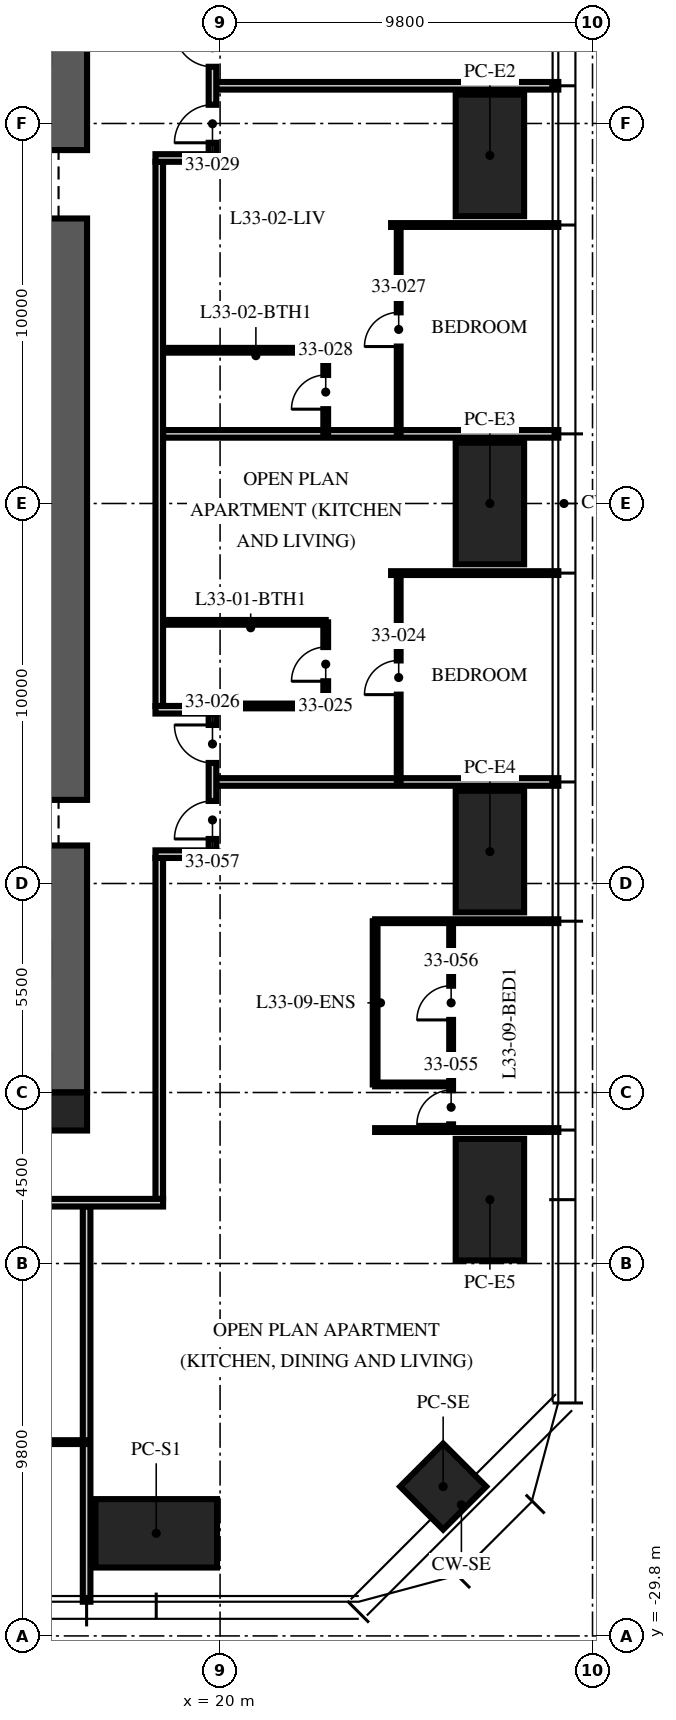
"""IFC4 building model, lengths in metres.
Left out: names, types, materials, properties, quantities, classifications, styles, units other than length and angle.
Written with IfcOpenShell. Run it as: python <this file> out.ifc"""

import sys

from ifc_helpers import new_model, si_unit, direction, frame, frame_2d, origin, origin_2d, place, context, subcontext, project, spatial, rectangle, extrude, element, fill, save


model = new_model("IFC4")
c1 = context("Model", 3, precision=1e-05, world=origin(), true_north=direction((0.0, 1.0)))
c2 = subcontext(c1, "Body", "Model", "MODEL_VIEW")
j1 = project(units=[si_unit("LENGTHUNIT", "METRE"), si_unit("PLANEANGLEUNIT", "RADIAN")], contexts=[c1])
p1 = place(None, origin())
s1 = spatial("IfcSite", under=j1, at=p1, CompositionType="ELEMENT")
p2 = place(p1, origin())
s2 = spatial("IfcBuilding", under=s1, at=p2, CompositionType="ELEMENT")
p3 = place(p2, frame((0.0, 0.0, 133.5)))
s3 = spatial("IfcBuildingStorey", under=s2, at=p3, CompositionType="ELEMENT", Elevation=133.5)
p4 = place(p3, frame((15.5, -15.5, -0.25), z_axis=(0.0, 0.0, 1.0), x_axis=(0.0, 1.0, 0.0)))
e1 = element("IfcWall", 1, at=p4, inside=s3, PredefinedType="SHEAR", context=c2, shape_type="SweptSolid", body=[
    extrude(rectangle(XDim=31.0, YDim=2.0, at=frame_2d((15.5, 0.0))), origin(), (0.0, 0.0, 1.0), 3.75),
])
p5 = place(p4, frame((6.5, 0.0, 0.25)))
e2 = element("IfcOpeningElement", 2, at=p5, cuts=e1, PredefinedType="OPENING", context=c2, shape_type="SweptSolid", body=[
    extrude(rectangle(XDim=1.2, YDim=2.1, at=frame_2d((0.6, 1.05))), frame((0.0, 1.01, 0.0), z_axis=(0.0, -1.0, 0.0), x_axis=(1.0, 0.0, 0.0)), (0.0, 0.0, 1.0), 2.02),
])
p6 = place(p4, frame((23.0, 0.0, 0.25)))
e3 = element("IfcOpeningElement", 3, at=p6, cuts=e1, PredefinedType="OPENING", context=c2, shape_type="SweptSolid", body=[
    extrude(rectangle(XDim=1.8, YDim=2.1, at=frame_2d((0.9, 1.05))), frame((0.0, 1.01, 0.0), z_axis=(0.0, -1.0, 0.0), x_axis=(1.0, 0.0, 0.0)), (0.0, 0.0, 1.0), 2.02),
])
p7 = place(p3, frame((16.0, -16.0, -0.25), z_axis=(0.0, 0.0, 1.0), x_axis=(1.0, 0.0, 0.0)))
e4 = element("IfcColumn", 4, at=p7, inside=s3, PredefinedType="COLUMN", context=c2, shape_type="SweptSolid", body=[
    extrude(rectangle(XDim=1.0, YDim=1.0, at=origin_2d()), origin(), (0.0, 0.0, 1.0), 3.75),
])
for number, where, z_axis, x_axis in (
    (5, (27.1, 9.16, 0.0), (0.0, 0.0, 1.0), (0.0, 1.0, 0.0)),
    (6, (27.1, 0.0, 0.0), (0.0, 0.0, 1.0), (0.0, 1.0, 0.0)),
    (7, (27.1, -9.16, 0.0), (0.0, 0.0, 1.0), (0.0, 1.0, 0.0)),
    (8, (27.1, -18.32, 0.0), (0.0, 0.0, 1.0), (0.0, 1.0, 0.0)),
    (9, (18.32, -27.1, 0.0), (0.0, 0.0, 1.0), (1.0, 0.0, 0.0)),
):
    element("IfcColumn", number, at=place(p3, frame(where, z_axis=z_axis, x_axis=x_axis)), inside=s3, PredefinedType="COLUMN", context=c2, shape_type="SweptSolid", body=[
        extrude(rectangle(XDim=3.2, YDim=1.8, at=origin_2d()), origin(), (0.0, 0.0, 1.0), 3.75),
    ])
p8 = place(p3, frame((25.87, -25.87, 0.0), z_axis=(0.0, 0.0, 1.0), x_axis=(0.707106781187, 0.707106781187, 0.0)))
e10 = element("IfcColumn", 10, at=p8, inside=s3, PredefinedType="COLUMN", context=c2, shape_type="SweptSolid", body=[
    extrude(rectangle(XDim=1.6, YDim=1.6, at=origin_2d()), origin(), (0.0, 0.0, 1.0), 3.75),
])
p9 = place(p3, frame((19.9, -7.328, 0.0), z_axis=(0.0, 0.0, 1.0), x_axis=(1.0, 0.0, 0.0)))
e11 = element("IfcWall", 11, at=p9, inside=s3, PredefinedType="PARTITIONING", context=c2, shape_type="SweptSolid", body=[
    extrude(rectangle(XDim=9.0, YDim=0.2, at=frame_2d((4.5, 0.0))), origin(), (0.0, 0.0, 1.0), 2.81),
])
p10 = place(p3, frame((24.5, -1.832, 0.0), z_axis=(0.0, 0.0, 1.0), x_axis=(1.0, 0.0, 0.0)))
e12 = element("IfcWall", 12, at=p10, inside=s3, PredefinedType="PARTITIONING", context=c2, shape_type="SweptSolid", body=[
    extrude(rectangle(XDim=4.4, YDim=0.1, at=frame_2d((2.2, 0.0))), origin(), (0.0, 0.0, 1.0), 2.81),
])
p11 = place(p3, frame((18.5, 1.832, 0.0), z_axis=(0.0, 0.0, 1.0), x_axis=(1.0, 0.0, 0.0)))
e13 = element("IfcWall", 13, at=p11, inside=s3, PredefinedType="PARTITIONING", context=c2, shape_type="SweptSolid", body=[
    extrude(rectangle(XDim=10.4, YDim=0.2, at=frame_2d((5.2, 0.0))), origin(), (0.0, 0.0, 1.0), 2.81),
])
p12 = place(p3, frame((24.5, 7.328, 0.0), z_axis=(0.0, 0.0, 1.0), x_axis=(1.0, 0.0, 0.0)))
e14 = element("IfcWall", 14, at=p12, inside=s3, PredefinedType="PARTITIONING", context=c2, shape_type="SweptSolid", body=[
    extrude(rectangle(XDim=4.4, YDim=0.1, at=frame_2d((2.2, 0.0))), origin(), (0.0, 0.0, 1.0), 2.81),
])
p13 = place(p3, frame((19.9, 10.992, 0.0), z_axis=(0.0, 0.0, 1.0), x_axis=(1.0, 0.0, 0.0)))
e15 = element("IfcWall", 15, at=p13, inside=s3, PredefinedType="PARTITIONING", context=c2, shape_type="SweptSolid", body=[
    extrude(rectangle(XDim=9.0, YDim=0.2, at=frame_2d((4.5, 0.0))), origin(), (0.0, 0.0, 1.0), 2.81),
])
p14 = place(p3, frame((16.488, -18.5, 0.0), z_axis=(0.0, 0.0, 1.0), x_axis=(0.0, -1.0, 0.0)))
e16 = element("IfcWall", 16, at=p14, inside=s3, PredefinedType="PARTITIONING", context=c2, shape_type="SweptSolid", body=[
    extrude(rectangle(XDim=10.4, YDim=0.2, at=frame_2d((5.2, 0.0))), origin(), (0.0, 0.0, 1.0), 2.81),
])
for number, where, z_axis, x_axis in (
    (17, (24.08, -16.488, 0.0), (0.0, 0.0, 1.0), (1.0, 0.0, 0.0)),
    (18, (24.08, -10.992, 0.0), (0.0, 0.0, 1.0), (1.0, 0.0, 0.0)),
):
    element("IfcWall", number, at=place(p3, frame(where, z_axis=z_axis, x_axis=x_axis)), inside=s3, PredefinedType="PARTITIONING", context=c2, shape_type="SweptSolid", body=[
        extrude(rectangle(XDim=4.82, YDim=0.1, at=frame_2d((2.41, 0.0))), origin(), (0.0, 0.0, 1.0), 2.81),
    ])
p15 = place(p3, frame((24.7, -7.328, 0.0), z_axis=(0.0, 0.0, 1.0), x_axis=(0.0, 1.0, 0.0)))
e19 = element("IfcWall", 19, at=p15, inside=s3, PredefinedType="PARTITIONING", context=c2, shape_type="SweptSolid", body=[
    extrude(rectangle(XDim=5.496, YDim=0.1, at=frame_2d((2.748, 0.0))), origin(), (0.0, 0.0, 1.0), 2.81),
])
p16 = place(p15, frame((2.298, 0.0, 0.0)))
e20 = element("IfcOpeningElement", 20, at=p16, cuts=e19, PredefinedType="OPENING", context=c2, shape_type="SweptSolid", body=[
    extrude(rectangle(XDim=0.9, YDim=2.1, at=frame_2d((0.45, 1.05))), frame((0.0, 0.06, 0.0), z_axis=(0.0, -1.0, 0.0), x_axis=(1.0, 0.0, 0.0)), (0.0, 0.0, 1.0), 0.12),
])
p17 = place(p3, frame((22.78, -5.328, 0.0), z_axis=(0.0, 0.0, 1.0), x_axis=(0.0, 1.0, 0.0)))
e21 = element("IfcWall", 21, at=p17, inside=s3, PredefinedType="PARTITIONING", context=c2, shape_type="SweptSolid", body=[
    extrude(rectangle(XDim=2.2, YDim=0.125, at=frame_2d((1.1, 0.0))), origin(), (0.0, 0.0, 1.0), 2.81),
])
p18 = place(p17, frame((0.65, 0.0, 0.0)))
e22 = element("IfcOpeningElement", 22, at=p18, cuts=e21, PredefinedType="OPENING", context=c2, shape_type="SweptSolid", body=[
    extrude(rectangle(XDim=0.9, YDim=2.1, at=frame_2d((0.45, 1.05))), frame((0.0, 0.073, 0.0), z_axis=(0.0, -1.0, 0.0), x_axis=(1.0, 0.0, 0.0)), (0.0, 0.0, 1.0), 0.145),
])
p19 = place(p3, frame((19.97, -5.328, 0.0), z_axis=(0.0, 0.0, 1.0), x_axis=(1.0, 0.0, 0.0)))
e23 = element("IfcWall", 23, at=p19, inside=s3, PredefinedType="PARTITIONING", context=c2, shape_type="SweptSolid", body=[
    extrude(rectangle(XDim=2.81, YDim=0.125, at=frame_2d((1.405, 0.0))), origin(), (0.0, 0.0, 1.0), 3.5),
])
p20 = place(p3, frame((18.5, -3.128, 0.0), z_axis=(0.0, 0.0, 1.0), x_axis=(1.0, 0.0, 0.0)))
e24 = element("IfcWall", 24, at=p20, inside=s3, PredefinedType="PARTITIONING", context=c2, shape_type="SweptSolid", body=[
    extrude(rectangle(XDim=4.28, YDim=0.125, at=frame_2d((2.14, 0.0))), origin(), (0.0, 0.0, 1.0), 3.5),
])
p21 = place(p3, frame((24.7, 1.832, 0.0), z_axis=(0.0, 0.0, 1.0), x_axis=(0.0, 1.0, 0.0)))
e25 = element("IfcWall", 25, at=p21, inside=s3, PredefinedType="PARTITIONING", context=c2, shape_type="SweptSolid", body=[
    extrude(rectangle(XDim=5.496, YDim=0.1, at=frame_2d((2.748, 0.0))), origin(), (0.0, 0.0, 1.0), 2.81),
])
p22 = place(p21, frame((2.298, 0.0, 0.0)))
e26 = element("IfcOpeningElement", 26, at=p22, cuts=e25, PredefinedType="OPENING", context=c2, shape_type="SweptSolid", body=[
    extrude(rectangle(XDim=0.9, YDim=2.1, at=frame_2d((0.45, 1.05))), frame((0.0, 0.06, 0.0), z_axis=(0.0, -1.0, 0.0), x_axis=(1.0, 0.0, 0.0)), (0.0, 0.0, 1.0), 0.12),
])
p23 = place(p3, frame((22.78, 1.832, 0.0), z_axis=(0.0, 0.0, 1.0), x_axis=(0.0, 1.0, 0.0)))
e27 = element("IfcWall", 27, at=p23, inside=s3, PredefinedType="PARTITIONING", context=c2, shape_type="SweptSolid", body=[
    extrude(rectangle(XDim=2.2, YDim=0.125, at=frame_2d((1.1, 0.0))), origin(), (0.0, 0.0, 1.0), 3.5),
])
p24 = place(p23, frame((0.65, 0.0, 0.0)))
e28 = element("IfcOpeningElement", 28, at=p24, cuts=e27, PredefinedType="OPENING", context=c2, shape_type="SweptSolid", body=[
    extrude(rectangle(XDim=0.9, YDim=2.1, at=frame_2d((0.45, 1.05))), frame((0.0, 0.073, 0.0), z_axis=(0.0, -1.0, 0.0), x_axis=(1.0, 0.0, 0.0)), (0.0, 0.0, 1.0), 0.145),
])
p25 = place(p3, frame((18.5, 4.032, 0.0), z_axis=(0.0, 0.0, 1.0), x_axis=(1.0, 0.0, 0.0)))
e29 = element("IfcWall", 29, at=p25, inside=s3, PredefinedType="PARTITIONING", context=c2, shape_type="SweptSolid", body=[
    extrude(rectangle(XDim=4.28, YDim=0.125, at=frame_2d((2.14, 0.0))), origin(), (0.0, 0.0, 1.0), 3.5),
])
p26 = place(p3, frame((10.992, -24.7, 0.0), z_axis=(0.0, 0.0, 1.0), x_axis=(1.0, 0.0, 0.0)))
e30 = element("IfcWall", 30, at=p26, inside=s3, PredefinedType="PARTITIONING", context=c2, shape_type="SweptSolid", body=[
    extrude(rectangle(XDim=5.496, YDim=0.1, at=frame_2d((2.748, 0.0))), origin(), (0.0, 0.0, 1.0), 2.81),
])
p27 = place(p26, frame((2.298, 0.0, 0.0)))
e31 = element("IfcOpeningElement", 31, at=p27, cuts=e30, PredefinedType="OPENING", context=c2, shape_type="SweptSolid", body=[
    extrude(rectangle(XDim=0.9, YDim=2.1, at=frame_2d((0.45, 1.05))), frame((0.0, 0.06, 0.0), z_axis=(0.0, -1.0, 0.0), x_axis=(1.0, 0.0, 0.0)), (0.0, 0.0, 1.0), 0.12),
])
p28 = place(p3, frame((26.08, -16.488, 0.0), z_axis=(0.0, 0.0, 1.0), x_axis=(0.0, 1.0, 0.0)))
e32 = element("IfcWall", 32, at=p28, inside=s3, PredefinedType="PARTITIONING", context=c2, shape_type="SweptSolid", body=[
    extrude(rectangle(XDim=5.496, YDim=0.1, at=frame_2d((2.748, 0.0))), origin(), (0.0, 0.0, 1.0), 2.81),
])
p29 = place(p28, frame((0.15, 0.0, 0.0)))
e33 = element("IfcOpeningElement", 33, at=p29, cuts=e32, PredefinedType="OPENING", context=c2, shape_type="SweptSolid", body=[
    extrude(rectangle(XDim=0.9, YDim=2.1, at=frame_2d((0.45, 1.05))), frame((0.0, 0.06, 0.0), z_axis=(0.0, -1.0, 0.0), x_axis=(1.0, 0.0, 0.0)), (0.0, 0.0, 1.0), 0.12),
])
p30 = place(p28, frame((2.898, 0.0, 0.0)))
e34 = element("IfcOpeningElement", 34, at=p30, cuts=e32, PredefinedType="OPENING", context=c2, shape_type="SweptSolid", body=[
    extrude(rectangle(XDim=0.9, YDim=2.1, at=frame_2d((0.45, 1.05))), frame((0.0, 0.06, 0.0), z_axis=(0.0, -1.0, 0.0), x_axis=(1.0, 0.0, 0.0)), (0.0, 0.0, 1.0), 0.12),
])
p31 = place(p3, frame((24.08, -15.288, 0.0), z_axis=(0.0, 0.0, 1.0), x_axis=(1.0, 0.0, 0.0)))
e35 = element("IfcWall", 35, at=p31, inside=s3, PredefinedType="PARTITIONING", context=c2, shape_type="SweptSolid", body=[
    extrude(rectangle(XDim=2.0, YDim=0.1, at=frame_2d((1.0, 0.0))), origin(), (0.0, 0.0, 1.0), 3.5),
])
p32 = place(p3, frame((24.08, -15.288, 0.0), z_axis=(0.0, 0.0, 1.0), x_axis=(0.0, 1.0, 0.0)))
e36 = element("IfcWall", 36, at=p32, inside=s3, PredefinedType="PARTITIONING", context=c2, shape_type="SweptSolid", body=[
    extrude(rectangle(XDim=4.296, YDim=0.125, at=frame_2d((2.148, 0.0))), origin(), (0.0, 0.0, 1.0), 2.81),
])
p33 = place(p3, frame((18.4, -18.3, 0.0), z_axis=(0.0, 0.0, 1.0), x_axis=(0.0, 1.0, 0.0)))
e37 = element("IfcWall", 37, at=p33, inside=s3, PredefinedType="PARTITIONING", context=c2, shape_type="SweptSolid", body=[
    extrude(rectangle(XDim=8.972, YDim=0.2, at=frame_2d((4.486, 0.0))), origin(), (0.0, 0.0, 1.0), 2.3),
])
p34 = place(p3, frame((18.3, -9.228, 0.0), z_axis=(0.0, 0.0, 1.0), x_axis=(1.0, 0.0, 0.0)))
e38 = element("IfcWall", 38, at=p34, inside=s3, PredefinedType="PARTITIONING", context=c2, shape_type="SweptSolid", body=[
    extrude(rectangle(XDim=1.6, YDim=0.2, at=frame_2d((0.8, 0.0))), origin(), (0.0, 0.0, 1.0), 2.7),
])
p35 = place(p3, frame((18.3, -5.428, 0.0), z_axis=(0.0, 0.0, 1.0), x_axis=(1.0, 0.0, 0.0)))
e39 = element("IfcWall", 39, at=p35, inside=s3, PredefinedType="PARTITIONING", context=c2, shape_type="SweptSolid", body=[
    extrude(rectangle(XDim=1.6, YDim=0.2, at=frame_2d((0.8, 0.0))), origin(), (0.0, 0.0, 1.0), 3.5),
])
p36 = place(p3, frame((19.8, -9.128, 0.0), z_axis=(0.0, 0.0, 1.0), x_axis=(0.0, 1.0, 0.0)))
e40 = element("IfcWall", 40, at=p36, inside=s3, PredefinedType="PARTITIONING", context=c2, shape_type="SweptSolid", body=[
    extrude(rectangle(XDim=3.6, YDim=0.2, at=frame_2d((1.8, 0.0))), origin(), (0.0, 0.0, 1.0), 2.7),
])
p37 = place(p36, frame((2.3, 0.0, 0.0)))
e41 = element("IfcOpeningElement", 41, at=p37, cuts=e40, PredefinedType="OPENING", context=c2, shape_type="SweptSolid", body=[
    extrude(rectangle(XDim=1.0, YDim=2.2, at=frame_2d((0.5, 1.1))), frame((0.0, 0.11, 0.0), z_axis=(0.0, -1.0, 0.0), x_axis=(1.0, 0.0, 0.0)), (0.0, 0.0, 1.0), 0.22),
])
p38 = place(p36, frame((0.3, 0.0, 0.0)))
e42 = element("IfcOpeningElement", 42, at=p38, cuts=e40, PredefinedType="OPENING", context=c2, shape_type="SweptSolid", body=[
    extrude(rectangle(XDim=1.0, YDim=2.2, at=frame_2d((0.5, 1.1))), frame((0.0, 0.11, 0.0), z_axis=(0.0, -1.0, 0.0), x_axis=(1.0, 0.0, 0.0)), (0.0, 0.0, 1.0), 0.22),
])
p39 = place(p3, frame((18.4, -5.328, 0.0), z_axis=(0.0, 0.0, 1.0), x_axis=(0.0, 1.0, 0.0)))
e43 = element("IfcWall", 43, at=p39, inside=s3, PredefinedType="PARTITIONING", context=c2, shape_type="SweptSolid", body=[
    extrude(rectangle(XDim=14.32, YDim=0.2, at=frame_2d((7.16, 0.0))), origin(), (0.0, 0.0, 1.0), 2.7),
])
p40 = place(p3, frame((18.3, 9.092, 0.0), z_axis=(0.0, 0.0, 1.0), x_axis=(1.0, 0.0, 0.0)))
e44 = element("IfcWall", 44, at=p40, inside=s3, PredefinedType="PARTITIONING", context=c2, shape_type="SweptSolid", body=[
    extrude(rectangle(XDim=1.6, YDim=0.2, at=frame_2d((0.8, 0.0))), origin(), (0.0, 0.0, 1.0), 2.7),
])
p41 = place(p3, frame((19.8, 9.192, 0.0), z_axis=(0.0, 0.0, 1.0), x_axis=(0.0, 1.0, 0.0)))
e45 = element("IfcWall", 45, at=p41, inside=s3, PredefinedType="PARTITIONING", context=c2, shape_type="SweptSolid", body=[
    extrude(rectangle(XDim=3.6, YDim=0.2, at=frame_2d((1.8, 0.0))), origin(), (0.0, 0.0, 1.0), 2.7),
])
p42 = place(p41, frame((0.3, 0.0, 0.0)))
e46 = element("IfcOpeningElement", 46, at=p42, cuts=e45, PredefinedType="OPENING", context=c2, shape_type="SweptSolid", body=[
    extrude(rectangle(XDim=1.0, YDim=2.2, at=frame_2d((0.5, 1.1))), frame((0.0, 0.11, 0.0), z_axis=(0.0, -1.0, 0.0), x_axis=(1.0, 0.0, 0.0)), (0.0, 0.0, 1.0), 0.22),
])
p43 = place(p41, frame((2.3, 0.0, 0.0)))
e47 = element("IfcOpeningElement", 47, at=p43, cuts=e45, PredefinedType="OPENING", context=c2, shape_type="SweptSolid", body=[
    extrude(rectangle(XDim=1.0, YDim=2.2, at=frame_2d((0.5, 1.1))), frame((0.0, 0.11, 0.0), z_axis=(0.0, -1.0, 0.0), x_axis=(1.0, 0.0, 0.0)), (0.0, 0.0, 1.0), 0.22),
])
p44 = place(p3, frame((18.5, -18.4, 0.0), z_axis=(0.0, 0.0, 1.0), x_axis=(-1.0, 0.0, 0.0)))
e48 = element("IfcWall", 48, at=p44, inside=s3, PredefinedType="PARTITIONING", context=c2, shape_type="SweptSolid", body=[
    extrude(rectangle(XDim=12.9, YDim=0.2, at=frame_2d((6.45, 0.0))), origin(), (0.0, 0.0, 1.0), 2.3),
])
p45 = place(p16, origin())
e49 = element("IfcDoor", 49, at=p45, inside=s3, OperationType="SINGLE_SWING_LEFT", PredefinedType="DOOR", context=c2, shape_type="SweptSolid", body=[
    extrude(rectangle(XDim=0.9, YDim=2.1, at=frame_2d((0.45, 1.05))), frame((0.0, 0.025, 0.0), z_axis=(0.0, -1.0, 0.0), x_axis=(1.0, 0.0, 0.0)), (0.0, 0.0, 1.0), 0.05),
])
fill(e20, e49)
p46 = place(p18, origin())
e50 = element("IfcDoor", 50, at=p46, inside=s3, OperationType="SINGLE_SWING_LEFT", PredefinedType="DOOR", context=c2, shape_type="SweptSolid", body=[
    extrude(rectangle(XDim=0.9, YDim=2.1, at=frame_2d((0.45, 1.05))), frame((0.0, 0.025, 0.0), z_axis=(0.0, -1.0, 0.0), x_axis=(1.0, 0.0, 0.0)), (0.0, 0.0, 1.0), 0.05),
])
fill(e22, e50)
p47 = place(p37, origin())
e51 = element("IfcDoor", 51, at=p47, inside=s3, OperationType="SINGLE_SWING_RIGHT", PredefinedType="DOOR", context=c2, shape_type="SweptSolid", body=[
    extrude(rectangle(XDim=1.0, YDim=2.2, at=frame_2d((0.5, 1.1))), frame((0.0, 0.025, 0.0), z_axis=(0.0, -1.0, 0.0), x_axis=(1.0, 0.0, 0.0)), (0.0, 0.0, 1.0), 0.05),
])
fill(e41, e51)
p48 = place(p22, origin())
e52 = element("IfcDoor", 52, at=p48, inside=s3, OperationType="SINGLE_SWING_LEFT", PredefinedType="DOOR", context=c2, shape_type="SweptSolid", body=[
    extrude(rectangle(XDim=0.9, YDim=2.1, at=frame_2d((0.45, 1.05))), frame((0.0, 0.025, 0.0), z_axis=(0.0, -1.0, 0.0), x_axis=(1.0, 0.0, 0.0)), (0.0, 0.0, 1.0), 0.05),
])
fill(e26, e52)
p49 = place(p24, origin())
e53 = element("IfcDoor", 53, at=p49, inside=s3, OperationType="SINGLE_SWING_LEFT", PredefinedType="DOOR", context=c2, shape_type="SweptSolid", body=[
    extrude(rectangle(XDim=0.9, YDim=2.1, at=frame_2d((0.45, 1.05))), frame((0.0, 0.025, 0.0), z_axis=(0.0, -1.0, 0.0), x_axis=(1.0, 0.0, 0.0)), (0.0, 0.0, 1.0), 0.05),
])
fill(e28, e53)
p50 = place(p42, origin())
e54 = element("IfcDoor", 54, at=p50, inside=s3, OperationType="SINGLE_SWING_LEFT", PredefinedType="DOOR", context=c2, shape_type="SweptSolid", body=[
    extrude(rectangle(XDim=1.0, YDim=2.2, at=frame_2d((0.5, 1.1))), frame((0.0, 0.025, 0.0), z_axis=(0.0, -1.0, 0.0), x_axis=(1.0, 0.0, 0.0)), (0.0, 0.0, 1.0), 0.05),
])
fill(e46, e54)
p51 = place(p43, origin())
e55 = element("IfcDoor", 55, at=p51, inside=s3, OperationType="SINGLE_SWING_RIGHT", PredefinedType="DOOR", context=c2, shape_type="SweptSolid", body=[
    extrude(rectangle(XDim=1.0, YDim=2.2, at=frame_2d((0.5, 1.1))), frame((0.0, 0.025, 0.0), z_axis=(0.0, -1.0, 0.0), x_axis=(1.0, 0.0, 0.0)), (0.0, 0.0, 1.0), 0.05),
])
fill(e47, e55)
p52 = place(p29, origin())
e56 = element("IfcDoor", 56, at=p52, inside=s3, OperationType="SINGLE_SWING_LEFT", PredefinedType="DOOR", context=c2, shape_type="SweptSolid", body=[
    extrude(rectangle(XDim=0.9, YDim=2.1, at=frame_2d((0.45, 1.05))), frame((0.0, 0.025, 0.0), z_axis=(0.0, -1.0, 0.0), x_axis=(1.0, 0.0, 0.0)), (0.0, 0.0, 1.0), 0.05),
])
fill(e33, e56)
p53 = place(p30, origin())
e57 = element("IfcDoor", 57, at=p53, inside=s3, OperationType="SINGLE_SWING_LEFT", PredefinedType="DOOR", context=c2, shape_type="SweptSolid", body=[
    extrude(rectangle(XDim=0.9, YDim=2.1, at=frame_2d((0.45, 1.05))), frame((0.0, 0.025, 0.0), z_axis=(0.0, -1.0, 0.0), x_axis=(1.0, 0.0, 0.0)), (0.0, 0.0, 1.0), 0.05),
])
fill(e34, e57)
p54 = place(p38, origin())
e58 = element("IfcDoor", 58, at=p54, inside=s3, OperationType="SINGLE_SWING_LEFT", PredefinedType="DOOR", context=c2, shape_type="SweptSolid", body=[
    extrude(rectangle(XDim=1.0, YDim=2.2, at=frame_2d((0.5, 1.1))), frame((0.0, 0.025, 0.0), z_axis=(0.0, -1.0, 0.0), x_axis=(1.0, 0.0, 0.0)), (0.0, 0.0, 1.0), 0.05),
])
fill(e42, e58)
save(model, sys.argv[1])
